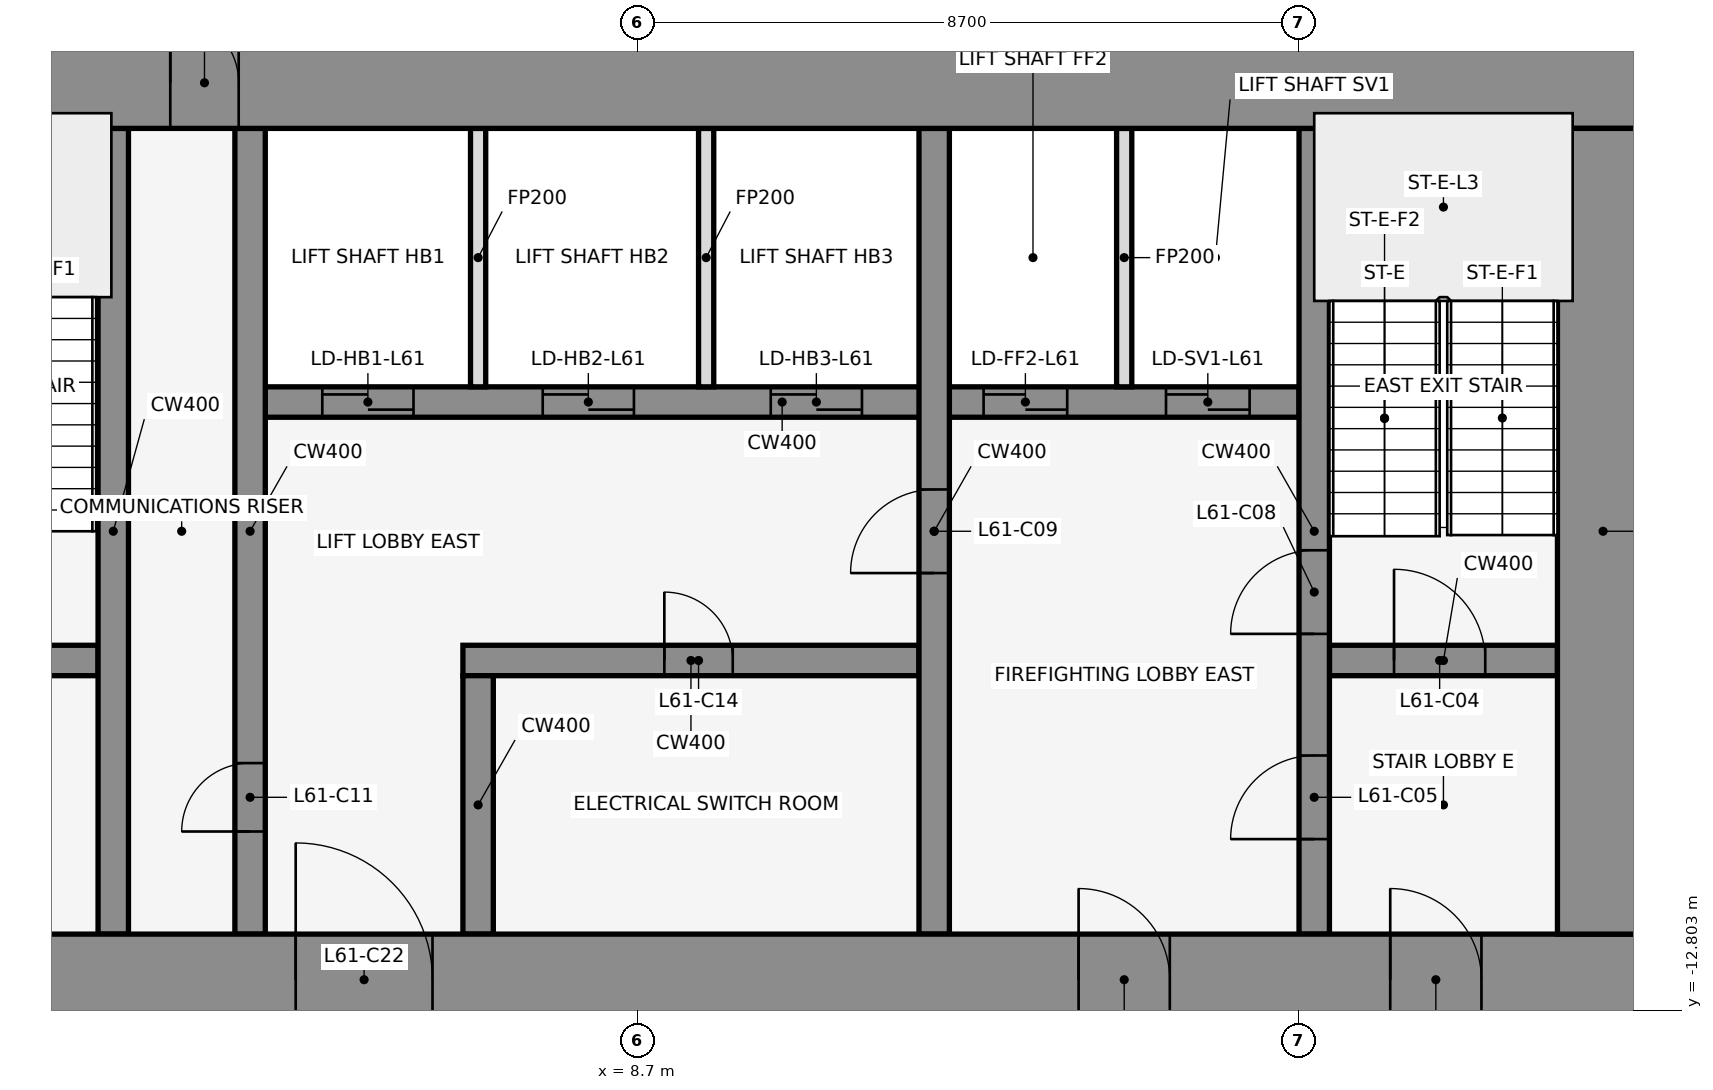
"""IFC4 building model, lengths in metres.
Left out: names, types, materials, properties, quantities, classifications, styles, units other than length and angle.
Written with IfcOpenShell. Run it as: python <this file> out.ifc"""

import sys

from ifc_helpers import new_model, si_unit, direction, frame, frame_2d, origin, place, context, subcontext, project, spatial, rectangle, extrude, element, fill, save


model = new_model("IFC4")
c1 = context("Model", 3, precision=1e-05, world=origin(), true_north=direction((0.0, 1.0)))
c2 = subcontext(c1, "Body", "Model", "MODEL_VIEW")
j1 = project(units=[si_unit("LENGTHUNIT", "METRE"), si_unit("PLANEANGLEUNIT", "RADIAN")], contexts=[c1])
p1 = place(None, origin())
s1 = spatial("IfcSite", under=j1, at=p1, CompositionType="ELEMENT")
p2 = place(p1, origin())
s2 = spatial("IfcBuilding", under=s1, at=p2, CompositionType="ELEMENT")
p3 = place(p2, frame((0.0, 0.0, 270.8)))
s3 = spatial("IfcBuildingStorey", under=s2, at=p3, CompositionType="ELEMENT", Elevation=270.8)
for number, where, z_axis, x_axis in (
    (1, (16.432, -0.105, 0.0), (0.0, 0.0, 1.0), (-0.84, 0.543, 0.0)),
    (2, (1.901, 1.08, 0.0), (0.0, 0.0, 1.0), (-0.84, -0.543, 0.0)),
):
    element("IfcWall", number, at=place(p3, frame(where, z_axis=z_axis, x_axis=x_axis)), inside=s3, PredefinedType="STANDARD", context=c2, shape_type="SweptSolid", body=[
        extrude(rectangle(XDim=2.183, YDim=0.25, at=frame_2d((1.091, 0.0))), origin(), (0.0, 0.0, 1.0), 4.05),
    ])
p4 = place(p3, frame((-1.6, -8.2, 0.0), z_axis=(0.0, 0.0, 1.0), x_axis=(1.0, 0.0, 0.0)))
e3 = element("IfcWall", 3, at=p4, inside=s3, PredefinedType="SHEAR", context=c2, shape_type="SweptSolid", body=[
    extrude(rectangle(XDim=3.2, YDim=0.4, at=frame_2d((1.6, 0.0))), origin(), (0.0, 0.0, 1.0), 4.2),
])
p5 = place(p4, frame((1.05, 0.0, 0.0)))
e4 = element("IfcOpeningElement", 4, at=p5, cuts=e3, PredefinedType="OPENING", context=c2, shape_type="SweptSolid", body=[
    extrude(rectangle(XDim=1.2, YDim=2.1, at=frame_2d((0.6, 1.05))), frame((0.0, 0.212, 0.0), z_axis=(0.0, -1.0, 0.0), x_axis=(1.0, 0.0, 0.0)), (0.0, 0.0, 1.0), 0.424),
])
p6 = place(p3, frame((6.4, -8.2, 0.0), z_axis=(0.0, 0.0, 1.0), x_axis=(1.0, 0.0, 0.0)))
e5 = element("IfcWall", 5, at=p6, inside=s3, PredefinedType="SHEAR", context=c2, shape_type="SweptSolid", body=[
    extrude(rectangle(XDim=6.0, YDim=0.4, at=frame_2d((3.0, 0.0))), origin(), (0.0, 0.0, 1.0), 4.2),
])
p7 = place(p6, frame((2.65, 0.0, 0.0)))
e6 = element("IfcOpeningElement", 6, at=p7, cuts=e5, PredefinedType="OPENING", context=c2, shape_type="SweptSolid", body=[
    extrude(rectangle(XDim=0.9, YDim=2.1, at=frame_2d((0.45, 1.05))), frame((0.0, 0.212, 0.0), z_axis=(0.0, -1.0, 0.0), x_axis=(1.0, 0.0, 0.0)), (0.0, 0.0, 1.0), 0.424),
])
p8 = place(p3, frame((17.8, -8.2, 0.0), z_axis=(0.0, 0.0, 1.0), x_axis=(1.0, 0.0, 0.0)))
e7 = element("IfcWall", 7, at=p8, inside=s3, PredefinedType="SHEAR", context=c2, shape_type="SweptSolid", body=[
    extrude(rectangle(XDim=3.0, YDim=0.4, at=frame_2d((1.5, 0.0))), origin(), (0.0, 0.0, 1.0), 4.2),
])
p9 = place(p8, frame((0.85, 0.0, 0.0)))
e8 = element("IfcOpeningElement", 8, at=p9, cuts=e7, PredefinedType="OPENING", context=c2, shape_type="SweptSolid", body=[
    extrude(rectangle(XDim=1.2, YDim=2.1, at=frame_2d((0.6, 1.05))), frame((0.0, 0.212, 0.0), z_axis=(0.0, -1.0, 0.0), x_axis=(1.0, 0.0, 0.0)), (0.0, 0.0, 1.0), 0.424),
])
p10 = place(p3, frame((3.8, -4.8, 0.0), z_axis=(0.0, 0.0, 1.0), x_axis=(1.0, 0.0, 0.0)))
e9 = element("IfcWall", 9, at=p10, inside=s3, PredefinedType="SHEAR", context=c2, shape_type="SweptSolid", body=[
    extrude(rectangle(XDim=13.6, YDim=0.4, at=frame_2d((6.8, 0.0))), origin(), (0.0, 0.0, 1.0), 4.2),
])
p11 = place(p10, frame((0.75, 0.0, 0.0)))
e10 = element("IfcOpeningElement", 10, at=p11, cuts=e9, PredefinedType="OPENING", context=c2, shape_type="SweptSolid", body=[
    extrude(rectangle(XDim=1.2, YDim=2.1, at=frame_2d((0.6, 1.05))), frame((0.0, 0.212, 0.0), z_axis=(0.0, -1.0, 0.0), x_axis=(1.0, 0.0, 0.0)), (0.0, 0.0, 1.0), 0.424),
])
p12 = place(p10, frame((3.65, 0.0, 0.0)))
e11 = element("IfcOpeningElement", 11, at=p12, cuts=e9, PredefinedType="OPENING", context=c2, shape_type="SweptSolid", body=[
    extrude(rectangle(XDim=1.2, YDim=2.1, at=frame_2d((0.6, 1.05))), frame((0.0, 0.212, 0.0), z_axis=(0.0, -1.0, 0.0), x_axis=(1.0, 0.0, 0.0)), (0.0, 0.0, 1.0), 0.424),
])
p13 = place(p10, frame((6.65, 0.0, 0.0)))
e12 = element("IfcOpeningElement", 12, at=p13, cuts=e9, PredefinedType="OPENING", context=c2, shape_type="SweptSolid", body=[
    extrude(rectangle(XDim=1.2, YDim=2.1, at=frame_2d((0.6, 1.05))), frame((0.0, 0.212, 0.0), z_axis=(0.0, -1.0, 0.0), x_axis=(1.0, 0.0, 0.0)), (0.0, 0.0, 1.0), 0.424),
])
p14 = place(p10, frame((9.45, 0.0, 0.0)))
e13 = element("IfcOpeningElement", 13, at=p14, cuts=e9, PredefinedType="OPENING", context=c2, shape_type="SweptSolid", body=[
    extrude(rectangle(XDim=1.1, YDim=2.1, at=frame_2d((0.55, 1.05))), frame((0.0, 0.212, 0.0), z_axis=(0.0, -1.0, 0.0), x_axis=(1.0, 0.0, 0.0)), (0.0, 0.0, 1.0), 0.424),
])
p15 = place(p10, frame((11.85, 0.0, 0.0)))
e14 = element("IfcOpeningElement", 14, at=p15, cuts=e9, PredefinedType="OPENING", context=c2, shape_type="SweptSolid", body=[
    extrude(rectangle(XDim=1.1, YDim=2.1, at=frame_2d((0.55, 1.05))), frame((0.0, 0.212, 0.0), z_axis=(0.0, -1.0, 0.0), x_axis=(1.0, 0.0, 0.0)), (0.0, 0.0, 1.0), 0.424),
])
p16 = place(p3, frame((1.8, -11.8, 0.0), z_axis=(0.0, 0.0, 1.0), x_axis=(0.0, 1.0, 0.0)))
e15 = element("IfcWall", 15, at=p16, inside=s3, PredefinedType="SHEAR", context=c2, shape_type="SweptSolid", body=[
    extrude(rectangle(XDim=10.6, YDim=0.4, at=frame_2d((5.3, 0.0))), origin(), (0.0, 0.0, 1.0), 4.2),
])
p17 = place(p3, frame((3.6, -11.8, 0.0), z_axis=(0.0, 0.0, 1.0), x_axis=(0.0, 1.0, 0.0)))
e16 = element("IfcWall", 16, at=p17, inside=s3, PredefinedType="SHEAR", context=c2, shape_type="SweptSolid", body=[
    extrude(rectangle(XDim=10.6, YDim=0.4, at=frame_2d((5.3, 0.0))), origin(), (0.0, 0.0, 1.0), 4.2),
])
p18 = place(p17, frame((1.35, 0.0, 0.0)))
e17 = element("IfcOpeningElement", 17, at=p18, cuts=e16, PredefinedType="OPENING", context=c2, shape_type="SweptSolid", body=[
    extrude(rectangle(XDim=0.9, YDim=2.1, at=frame_2d((0.45, 1.05))), frame((0.0, 0.212, 0.0), z_axis=(0.0, -1.0, 0.0), x_axis=(1.0, 0.0, 0.0)), (0.0, 0.0, 1.0), 0.424),
])
p19 = place(p3, frame((6.6, -11.8, 0.0), z_axis=(0.0, 0.0, 1.0), x_axis=(0.0, 1.0, 0.0)))
e18 = element("IfcWall", 18, at=p19, inside=s3, PredefinedType="SHEAR", context=c2, shape_type="SweptSolid", body=[
    extrude(rectangle(XDim=3.4, YDim=0.4, at=frame_2d((1.7, 0.0))), origin(), (0.0, 0.0, 1.0), 4.2),
])
for number, where, z_axis, x_axis in (
    (19, (6.6, -4.6, 0.0), (0.0, 0.0, 1.0), (0.0, 1.0, 0.0)),
    (20, (9.6, -4.6, 0.0), (0.0, 0.0, 1.0), (0.0, 1.0, 0.0)),
):
    element("IfcWall", number, at=place(p3, frame(where, z_axis=z_axis, x_axis=x_axis)), inside=s3, PredefinedType="PARTITIONING", context=c2, shape_type="SweptSolid", body=[
        extrude(rectangle(XDim=3.4, YDim=0.2, at=frame_2d((1.7, 0.0))), origin(), (0.0, 0.0, 1.0), 3.118),
    ])
p20 = place(p3, frame((12.6, -11.8, 0.0), z_axis=(0.0, 0.0, 1.0), x_axis=(0.0, 1.0, 0.0)))
e21 = element("IfcWall", 21, at=p20, inside=s3, PredefinedType="SHEAR", context=c2, shape_type="SweptSolid", body=[
    extrude(rectangle(XDim=10.6, YDim=0.4, at=frame_2d((5.3, 0.0))), origin(), (0.0, 0.0, 1.0), 4.2),
])
p21 = place(p20, frame((4.75, 0.0, 0.0)))
e22 = element("IfcOpeningElement", 22, at=p21, cuts=e21, PredefinedType="OPENING", context=c2, shape_type="SweptSolid", body=[
    extrude(rectangle(XDim=1.1, YDim=2.1, at=frame_2d((0.55, 1.05))), frame((0.0, 0.212, 0.0), z_axis=(0.0, -1.0, 0.0), x_axis=(1.0, 0.0, 0.0)), (0.0, 0.0, 1.0), 0.424),
])
p22 = place(p3, frame((15.1, -4.6, 0.0), z_axis=(0.0, 0.0, 1.0), x_axis=(0.0, 1.0, 0.0)))
e23 = element("IfcWall", 23, at=p22, inside=s3, PredefinedType="PARTITIONING", context=c2, shape_type="SweptSolid", body=[
    extrude(rectangle(XDim=3.4, YDim=0.2, at=frame_2d((1.7, 0.0))), origin(), (0.0, 0.0, 1.0), 3.118),
])
p23 = place(p3, frame((17.6, -11.8, 0.0), z_axis=(0.0, 0.0, 1.0), x_axis=(0.0, 1.0, 0.0)))
e24 = element("IfcWall", 24, at=p23, inside=s3, PredefinedType="SHEAR", context=c2, shape_type="SweptSolid", body=[
    extrude(rectangle(XDim=10.6, YDim=0.4, at=frame_2d((5.3, 0.0))), origin(), (0.0, 0.0, 1.0), 4.2),
])
p24 = place(p23, frame((1.25, 0.0, 0.0)))
e25 = element("IfcOpeningElement", 25, at=p24, cuts=e24, PredefinedType="OPENING", context=c2, shape_type="SweptSolid", body=[
    extrude(rectangle(XDim=1.1, YDim=2.1, at=frame_2d((0.55, 1.05))), frame((0.0, 0.212, 0.0), z_axis=(0.0, -1.0, 0.0), x_axis=(1.0, 0.0, 0.0)), (0.0, 0.0, 1.0), 0.424),
])
p25 = place(p23, frame((3.95, 0.0, 0.0)))
e26 = element("IfcOpeningElement", 26, at=p25, cuts=e24, PredefinedType="OPENING", context=c2, shape_type="SweptSolid", body=[
    extrude(rectangle(XDim=1.1, YDim=2.1, at=frame_2d((0.55, 1.05))), frame((0.0, 0.212, 0.0), z_axis=(0.0, -1.0, 0.0), x_axis=(1.0, 0.0, 0.0)), (0.0, 0.0, 1.0), 0.424),
])
p26 = place(p3, frame((-22.0, -0.6, 0.0), z_axis=(0.0, 0.0, 1.0), x_axis=(1.0, 0.0, 0.0)))
e27 = element("IfcWall", 27, at=p26, inside=s3, PredefinedType="SHEAR", context=c2, shape_type="SweptSolid", body=[
    extrude(rectangle(XDim=44.0, YDim=1.2, at=frame_2d((22.0, 0.0))), origin(), (0.0, 0.0, 1.0), 4.2),
])
p27 = place(p26, frame((18.55, 0.0, 0.0)))
e28 = element("IfcOpeningElement", 28, at=p27, cuts=e27, PredefinedType="OPENING", context=c2, shape_type="SweptSolid", body=[
    extrude(rectangle(XDim=0.9, YDim=2.1, at=frame_2d((0.45, 1.05))), frame((0.0, 0.612, 0.0), z_axis=(0.0, -1.0, 0.0), x_axis=(1.0, 0.0, 0.0)), (0.0, 0.0, 1.0), 1.224),
])
p28 = place(p26, frame((24.55, 0.0, 0.0)))
e29 = element("IfcOpeningElement", 29, at=p28, cuts=e27, PredefinedType="OPENING", context=c2, shape_type="SweptSolid", body=[
    extrude(rectangle(XDim=0.9, YDim=2.1, at=frame_2d((0.45, 1.05))), frame((0.0, 0.612, 0.0), z_axis=(0.0, -1.0, 0.0), x_axis=(1.0, 0.0, 0.0)), (0.0, 0.0, 1.0), 1.224),
])
p29 = place(p3, frame((-22.0, -12.4, 0.0), z_axis=(0.0, 0.0, 1.0), x_axis=(1.0, 0.0, 0.0)))
e30 = element("IfcWall", 30, at=p29, inside=s3, PredefinedType="SHEAR", context=c2, shape_type="SweptSolid", body=[
    extrude(rectangle(XDim=44.0, YDim=1.2, at=frame_2d((22.0, 0.0))), origin(), (0.0, 0.0, 1.0), 4.2),
])
p30 = place(p29, frame((2.2, 0.0, 0.0)))
e31 = element("IfcOpeningElement", 31, at=p30, cuts=e30, PredefinedType="OPENING", context=c2, shape_type="SweptSolid", body=[
    extrude(rectangle(XDim=1.2, YDim=2.1, at=frame_2d((0.6, 1.05))), frame((0.0, 0.612, 0.0), z_axis=(0.0, -1.0, 0.0), x_axis=(1.0, 0.0, 0.0)), (0.0, 0.0, 1.0), 1.224),
])
p31 = place(p29, frame((21.4, 0.0, 0.0)))
e32 = element("IfcOpeningElement", 32, at=p31, cuts=e30, PredefinedType="OPENING", context=c2, shape_type="SweptSolid", body=[
    extrude(rectangle(XDim=1.2, YDim=2.1, at=frame_2d((0.6, 1.05))), frame((0.0, 0.612, 0.0), z_axis=(0.0, -1.0, 0.0), x_axis=(1.0, 0.0, 0.0)), (0.0, 0.0, 1.0), 1.224),
])
p32 = place(p29, frame((40.6, 0.0, 0.0)))
e33 = element("IfcOpeningElement", 33, at=p32, cuts=e30, PredefinedType="OPENING", context=c2, shape_type="SweptSolid", body=[
    extrude(rectangle(XDim=1.2, YDim=2.1, at=frame_2d((0.6, 1.05))), frame((0.0, 0.612, 0.0), z_axis=(0.0, -1.0, 0.0), x_axis=(1.0, 0.0, 0.0)), (0.0, 0.0, 1.0), 1.224),
])
p33 = place(p29, frame((16.0, 0.0, 0.0)))
e34 = element("IfcOpeningElement", 34, at=p33, cuts=e30, PredefinedType="OPENING", context=c2, shape_type="SweptSolid", body=[
    extrude(rectangle(XDim=1.8, YDim=2.1, at=frame_2d((0.9, 1.05))), frame((0.0, 0.612, 0.0), z_axis=(0.0, -1.0, 0.0), x_axis=(1.0, 0.0, 0.0)), (0.0, 0.0, 1.0), 1.224),
])
p34 = place(p29, frame((6.3, 0.0, 0.0)))
e35 = element("IfcOpeningElement", 35, at=p34, cuts=e30, PredefinedType="OPENING", context=c2, shape_type="SweptSolid", body=[
    extrude(rectangle(XDim=1.2, YDim=2.1, at=frame_2d((0.6, 1.05))), frame((0.0, 0.612, 0.0), z_axis=(0.0, -1.0, 0.0), x_axis=(1.0, 0.0, 0.0)), (0.0, 0.0, 1.0), 1.224),
])
p35 = place(p29, frame((26.2, 0.0, 0.0)))
e36 = element("IfcOpeningElement", 36, at=p35, cuts=e30, PredefinedType="OPENING", context=c2, shape_type="SweptSolid", body=[
    extrude(rectangle(XDim=1.8, YDim=2.1, at=frame_2d((0.9, 1.05))), frame((0.0, 0.612, 0.0), z_axis=(0.0, -1.0, 0.0), x_axis=(1.0, 0.0, 0.0)), (0.0, 0.0, 1.0), 1.224),
])
p36 = place(p29, frame((36.5, 0.0, 0.0)))
e37 = element("IfcOpeningElement", 37, at=p36, cuts=e30, PredefinedType="OPENING", context=c2, shape_type="SweptSolid", body=[
    extrude(rectangle(XDim=1.2, YDim=2.1, at=frame_2d((0.6, 1.05))), frame((0.0, 0.612, 0.0), z_axis=(0.0, -1.0, 0.0), x_axis=(1.0, 0.0, 0.0)), (0.0, 0.0, 1.0), 1.224),
])
p37 = place(p3, frame((21.4, -11.8, 0.0), z_axis=(0.0, 0.0, 1.0), x_axis=(0.0, 1.0, 0.0)))
e38 = element("IfcWall", 38, at=p37, inside=s3, PredefinedType="SHEAR", context=c2, shape_type="SweptSolid", body=[
    extrude(rectangle(XDim=10.6, YDim=1.2, at=frame_2d((5.3, 0.0))), origin(), (0.0, 0.0, 1.0), 4.2),
])
p38 = place(p9, origin())
e39 = element("IfcDoor", 39, at=p38, inside=s3, OperationType="SINGLE_SWING_RIGHT", PredefinedType="DOOR", context=c2, shape_type="SweptSolid", body=[
    extrude(rectangle(XDim=1.2, YDim=2.1, at=frame_2d((0.6, 1.05))), frame((0.0, 0.025, 0.0), z_axis=(0.0, -1.0, 0.0), x_axis=(1.0, 0.0, 0.0)), (0.0, 0.0, 1.0), 0.05),
])
fill(e8, e39)
p39 = place(p24, origin())
e40 = element("IfcDoor", 40, at=p39, inside=s3, OperationType="SINGLE_SWING_LEFT", PredefinedType="DOOR", context=c2, shape_type="SweptSolid", body=[
    extrude(rectangle(XDim=1.1, YDim=2.1, at=frame_2d((0.55, 1.05))), frame((0.0, 0.025, 0.0), z_axis=(0.0, -1.0, 0.0), x_axis=(1.0, 0.0, 0.0)), (0.0, 0.0, 1.0), 0.05),
])
fill(e25, e40)
p40 = place(p11, origin())
e41 = element("IfcDoor", 41, at=p40, inside=s3, OperationType="DOUBLE_DOOR_SLIDING", PredefinedType="DOOR", context=c2, shape_type="SweptSolid", body=[
    extrude(rectangle(XDim=1.2, YDim=2.1, at=frame_2d((0.6, 1.05))), frame((0.0, 0.025, 0.0), z_axis=(0.0, -1.0, 0.0), x_axis=(1.0, 0.0, 0.0)), (0.0, 0.0, 1.0), 0.05),
])
fill(e10, e41)
p41 = place(p12, origin())
e42 = element("IfcDoor", 42, at=p41, inside=s3, OperationType="DOUBLE_DOOR_SLIDING", PredefinedType="DOOR", context=c2, shape_type="SweptSolid", body=[
    extrude(rectangle(XDim=1.2, YDim=2.1, at=frame_2d((0.6, 1.05))), frame((0.0, 0.025, 0.0), z_axis=(0.0, -1.0, 0.0), x_axis=(1.0, 0.0, 0.0)), (0.0, 0.0, 1.0), 0.05),
])
fill(e11, e42)
p42 = place(p13, origin())
e43 = element("IfcDoor", 43, at=p42, inside=s3, OperationType="DOUBLE_DOOR_SLIDING", PredefinedType="DOOR", context=c2, shape_type="SweptSolid", body=[
    extrude(rectangle(XDim=1.2, YDim=2.1, at=frame_2d((0.6, 1.05))), frame((0.0, 0.025, 0.0), z_axis=(0.0, -1.0, 0.0), x_axis=(1.0, 0.0, 0.0)), (0.0, 0.0, 1.0), 0.05),
])
fill(e12, e43)
p43 = place(p14, origin())
e44 = element("IfcDoor", 44, at=p43, inside=s3, OperationType="DOUBLE_DOOR_SLIDING", PredefinedType="DOOR", context=c2, shape_type="SweptSolid", body=[
    extrude(rectangle(XDim=1.1, YDim=2.1, at=frame_2d((0.55, 1.05))), frame((0.0, 0.025, 0.0), z_axis=(0.0, -1.0, 0.0), x_axis=(1.0, 0.0, 0.0)), (0.0, 0.0, 1.0), 0.05),
])
fill(e13, e44)
p44 = place(p15, origin())
e45 = element("IfcDoor", 45, at=p44, inside=s3, OperationType="DOUBLE_DOOR_SLIDING", PredefinedType="DOOR", context=c2, shape_type="SweptSolid", body=[
    extrude(rectangle(XDim=1.1, YDim=2.1, at=frame_2d((0.55, 1.05))), frame((0.0, 0.025, 0.0), z_axis=(0.0, -1.0, 0.0), x_axis=(1.0, 0.0, 0.0)), (0.0, 0.0, 1.0), 0.05),
])
fill(e14, e45)
p45 = place(p25, origin())
e46 = element("IfcDoor", 46, at=p45, inside=s3, OperationType="SINGLE_SWING_RIGHT", PredefinedType="DOOR", context=c2, shape_type="SweptSolid", body=[
    extrude(rectangle(XDim=1.1, YDim=2.1, at=frame_2d((0.55, 1.05))), frame((0.0, 0.025, 0.0), z_axis=(0.0, -1.0, 0.0), x_axis=(1.0, 0.0, 0.0)), (0.0, 0.0, 1.0), 0.05),
])
fill(e26, e46)
p46 = place(p21, frame((1.1, 0.0, 0.0), z_axis=(0.0, 0.0, 1.0), x_axis=(-1.0, 0.0, 0.0)))
e47 = element("IfcDoor", 47, at=p46, inside=s3, OperationType="SINGLE_SWING_RIGHT", PredefinedType="DOOR", context=c2, shape_type="SweptSolid", body=[
    extrude(rectangle(XDim=1.1, YDim=2.1, at=frame_2d((0.55, 1.05))), frame((0.0, 0.025, 0.0), z_axis=(0.0, -1.0, 0.0), x_axis=(1.0, 0.0, 0.0)), (0.0, 0.0, 1.0), 0.05),
])
fill(e22, e47)
p47 = place(p18, origin())
e48 = element("IfcDoor", 48, at=p47, inside=s3, OperationType="SINGLE_SWING_LEFT", PredefinedType="DOOR", context=c2, shape_type="SweptSolid", body=[
    extrude(rectangle(XDim=0.9, YDim=2.1, at=frame_2d((0.45, 1.05))), frame((0.0, 0.025, 0.0), z_axis=(0.0, -1.0, 0.0), x_axis=(1.0, 0.0, 0.0)), (0.0, 0.0, 1.0), 0.05),
])
fill(e17, e48)
p48 = place(p7, frame((0.9, 0.0, 0.0), z_axis=(0.0, 0.0, 1.0), x_axis=(-1.0, 0.0, 0.0)))
e49 = element("IfcDoor", 49, at=p48, inside=s3, OperationType="SINGLE_SWING_LEFT", PredefinedType="DOOR", context=c2, shape_type="SweptSolid", body=[
    extrude(rectangle(XDim=0.9, YDim=2.1, at=frame_2d((0.45, 1.05))), frame((0.0, 0.025, 0.0), z_axis=(0.0, -1.0, 0.0), x_axis=(1.0, 0.0, 0.0)), (0.0, 0.0, 1.0), 0.05),
])
fill(e6, e49)
p49 = place(p28, origin())
e50 = element("IfcDoor", 50, at=p49, inside=s3, OperationType="SINGLE_SWING_LEFT", PredefinedType="DOOR", context=c2, shape_type="SweptSolid", body=[
    extrude(rectangle(XDim=0.9, YDim=2.1, at=frame_2d((0.45, 1.05))), frame((0.0, 0.025, 0.0), z_axis=(0.0, -1.0, 0.0), x_axis=(1.0, 0.0, 0.0)), (0.0, 0.0, 1.0), 0.05),
])
fill(e29, e50)
p50 = place(p32, frame((1.2, 0.0, 0.0), z_axis=(0.0, 0.0, 1.0), x_axis=(-1.0, 0.0, 0.0)))
e51 = element("IfcDoor", 51, at=p50, inside=s3, OperationType="SINGLE_SWING_RIGHT", PredefinedType="DOOR", context=c2, shape_type="SweptSolid", body=[
    extrude(rectangle(XDim=1.2, YDim=2.1, at=frame_2d((0.6, 1.05))), frame((0.0, 0.025, 0.0), z_axis=(0.0, -1.0, 0.0), x_axis=(1.0, 0.0, 0.0)), (0.0, 0.0, 1.0), 0.05),
])
fill(e33, e51)
p51 = place(p35, origin())
e52 = element("IfcDoor", 52, at=p51, inside=s3, OperationType="SINGLE_SWING_LEFT", PredefinedType="DOOR", context=c2, shape_type="SweptSolid", body=[
    extrude(rectangle(XDim=1.8, YDim=2.1, at=frame_2d((0.9, 1.05))), frame((0.0, 0.025, 0.0), z_axis=(0.0, -1.0, 0.0), x_axis=(1.0, 0.0, 0.0)), (0.0, 0.0, 1.0), 0.05),
])
fill(e36, e52)
p52 = place(p36, frame((1.2, 0.0, 0.0), z_axis=(0.0, 0.0, 1.0), x_axis=(-1.0, 0.0, 0.0)))
e53 = element("IfcDoor", 53, at=p52, inside=s3, OperationType="SINGLE_SWING_RIGHT", PredefinedType="DOOR", context=c2, shape_type="SweptSolid", body=[
    extrude(rectangle(XDim=1.2, YDim=2.1, at=frame_2d((0.6, 1.05))), frame((0.0, 0.025, 0.0), z_axis=(0.0, -1.0, 0.0), x_axis=(1.0, 0.0, 0.0)), (0.0, 0.0, 1.0), 0.05),
])
fill(e37, e53)
save(model, sys.argv[1])
